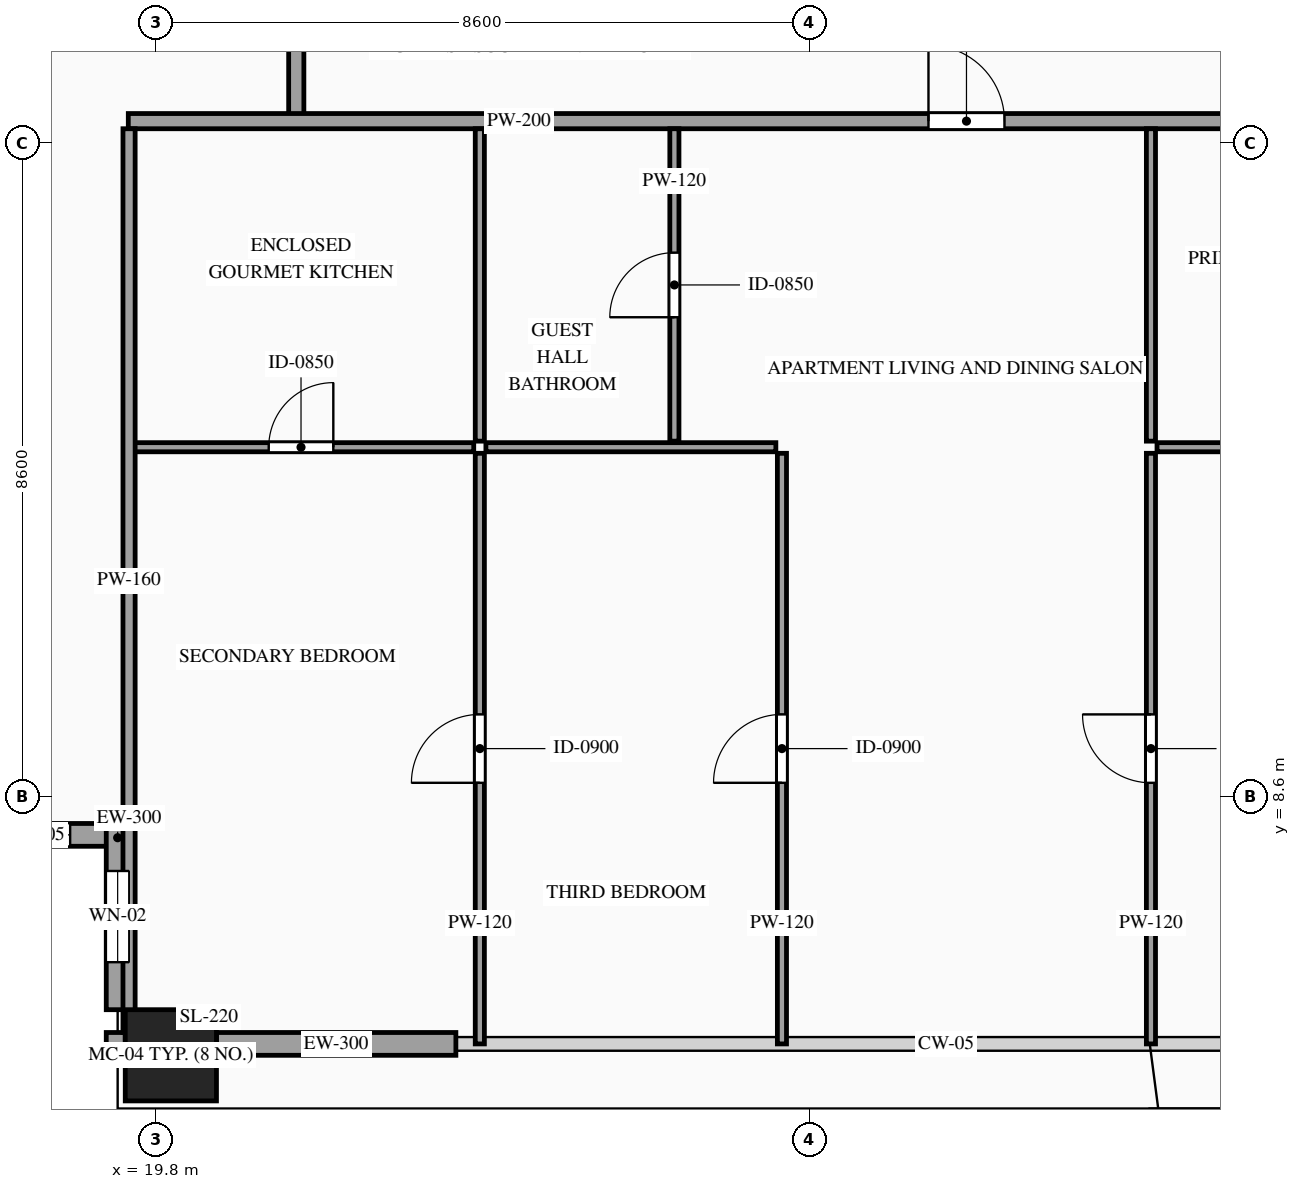
"""IFC4 building model, lengths in metres.
Left out: names, types, materials, properties, quantities, classifications, styles, units other than length and angle.
Written with IfcOpenShell. Run it as: python <this file> out.ifc"""

import sys

from ifc_helpers import new_model, si_unit, direction, frame, frame_2d, origin, origin_2d, place, context, subcontext, project, spatial, rectangle, hollow_rectangle, extrude, source, transform, mapped, element, fill, save


model = new_model("IFC4")
c1 = context("Model", 3, precision=1e-05, world=origin(), true_north=direction((0.0, 1.0)))
c2 = subcontext(c1, "Body", "Model", "MODEL_VIEW")
j1 = project(units=[si_unit("LENGTHUNIT", "METRE"), si_unit("PLANEANGLEUNIT", "RADIAN")], contexts=[c1])
p1 = place(None, origin())
s1 = spatial("IfcSite", under=j1, at=p1, CompositionType="ELEMENT")
p2 = place(p1, origin())
s2 = spatial("IfcBuilding", under=s1, at=p2, CompositionType="ELEMENT")
p3 = place(p2, frame((0.0, 0.0, 278.6)))
s3 = spatial("IfcBuildingStorey", under=s2, at=p3, CompositionType="ELEMENT", Elevation=278.6)
m1 = source(origin(), c2, "Body", "SweptSolid", [
    extrude(hollow_rectangle(XDim=1.2, YDim=1.2, WallThickness=0.055, at=origin_2d()), origin(), (0.0, 0.0, 1.0), 3.5),
])
p4 = place(p3, frame((20.0, 5.2, 0.0), z_axis=(0.0, 0.0, 1.0), x_axis=(1.0, 0.0, 0.0)))
e1 = element("IfcColumn", 1, at=p4, inside=s3, PredefinedType="COLUMN", context=c2, shape_type="MappedRepresentation", body=[
    mapped(m1, transform((0.0, 0.0, 0.0), scale=1.0)),
])
p5 = place(p3, frame((17.0, 8.1, 0.0), z_axis=(0.0, 0.0, 1.0), x_axis=(1.0, 0.0, 0.0)))
e2 = element("IfcWall", 2, at=p5, inside=s3, PredefinedType="SOLIDWALL", context=c2, shape_type="SweptSolid", body=[
    extrude(rectangle(XDim=2.45, YDim=0.3, at=frame_2d((1.225, 0.0))), origin(), (0.0, 0.0, 1.0), 3.28),
])
p6 = place(p5, frame((0.775, 0.0, 0.85)))
e3 = element("IfcOpeningElement", 3, at=p6, cuts=e2, PredefinedType="OPENING", context=c2, shape_type="SweptSolid", body=[
    extrude(rectangle(XDim=0.9, YDim=1.5, at=frame_2d((0.45, 0.75))), frame((0.0, 0.165, 0.0), z_axis=(0.0, -1.0, 0.0), x_axis=(1.0, 0.0, 0.0)), (0.0, 0.0, 1.0), 0.33),
])
p7 = place(p3, frame((19.3, 8.25, 0.0), z_axis=(0.0, 0.0, 1.0), x_axis=(0.0, -1.0, 0.0)))
e4 = element("IfcWall", 4, at=p7, inside=s3, PredefinedType="SOLIDWALL", context=c2, shape_type="SweptSolid", body=[
    extrude(rectangle(XDim=2.45, YDim=0.3, at=frame_2d((1.225, 0.0))), origin(), (0.0, 0.0, 1.0), 3.28),
])
p8 = place(p7, frame((0.625, 0.0, 0.85)))
e5 = element("IfcOpeningElement", 5, at=p8, cuts=e4, PredefinedType="OPENING", context=c2, shape_type="SweptSolid", body=[
    extrude(rectangle(XDim=1.2, YDim=2.1, at=frame_2d((0.6, 1.05))), frame((0.0, 0.165, 0.0), z_axis=(0.0, -1.0, 0.0), x_axis=(1.0, 0.0, 0.0)), (0.0, 0.0, 1.0), 0.33),
])
m2 = source(origin(), c2, "Body", "SweptSolid", [
    extrude(rectangle(XDim=0.25, YDim=0.3, at=frame_2d((0.125, 0.0))), origin(), (0.0, 0.0, 1.0), 3.28),
])
p9 = place(p3, frame((19.15, 5.35, 0.0), z_axis=(0.0, 0.0, 1.0), x_axis=(1.0, 0.0, 0.0)))
e6 = element("IfcWall", 6, at=p9, inside=s3, PredefinedType="SOLIDWALL", context=c2, shape_type="MappedRepresentation", body=[
    mapped(m2, transform((0.0, 0.0, 0.0), scale=1.0)),
])
m3 = source(origin(), c2, "Body", "SweptSolid", [
    extrude(rectangle(XDim=3.15, YDim=0.3, at=frame_2d((1.575, 0.0))), origin(), (0.0, 0.0, 1.0), 2.835),
])
p10 = place(p3, frame((20.6, 5.35, 0.0), z_axis=(0.0, 0.0, 1.0), x_axis=(1.0, 0.0, 0.0)))
e7 = element("IfcWall", 7, at=p10, inside=s3, PredefinedType="SOLIDWALL", context=c2, shape_type="MappedRepresentation", body=[
    mapped(m3, transform((0.0, 0.0, 0.0), scale=1.0)),
])
m4 = source(origin(), c2, "Body", "SweptSolid", [
    extrude(rectangle(XDim=1.7, YDim=0.2, at=frame_2d((0.85, 0.0))), origin(), (0.0, 0.0, 1.0), 3.28),
])
p11 = place(p3, frame((21.65, 17.55, 0.0), z_axis=(0.0, 0.0, 1.0), x_axis=(0.0, 1.0, 0.0)))
e8 = element("IfcWall", 8, at=p11, inside=s3, PredefinedType="PARTITIONING", context=c2, shape_type="MappedRepresentation", body=[
    mapped(m4, transform((0.0, 0.0, 0.0), scale=1.0)),
])
p12 = place(p3, frame((19.44, 17.49, 0.0), z_axis=(0.0, 0.0, 1.0), x_axis=(1.0, 0.0, 0.0)))
e9 = element("IfcWall", 9, at=p12, inside=s3, PredefinedType="PARTITIONING", context=c2, shape_type="SweptSolid", body=[
    extrude(rectangle(XDim=18.182, YDim=0.2, at=frame_2d((9.091, 0.0))), origin(), (0.0, 0.0, 1.0), 3.28),
])
p13 = place(p12, frame((10.528, 0.0, 0.0)))
e10 = element("IfcOpeningElement", 10, at=p13, cuts=e9, PredefinedType="OPENING", context=c2, shape_type="SweptSolid", body=[
    extrude(rectangle(XDim=1.0, YDim=2.2, at=frame_2d((0.5, 1.1))), frame((0.0, 0.115, 0.0), z_axis=(0.0, -1.0, 0.0), x_axis=(1.0, 0.0, 0.0)), (0.0, 0.0, 1.0), 0.23),
])
p14 = place(p3, frame((19.44, 13.2, 0.0), z_axis=(0.0, 0.0, 1.0), x_axis=(1.0, 0.0, 0.0)))
e11 = element("IfcWall", 11, at=p14, inside=s3, PredefinedType="PARTITIONING", context=c2, shape_type="SweptSolid", body=[
    extrude(rectangle(XDim=4.545, YDim=0.12, at=frame_2d((2.272, 0.0))), origin(), (0.0, 0.0, 1.0), 3.28),
])
p15 = place(p14, frame((1.847, 0.0, 0.0)))
e12 = element("IfcOpeningElement", 12, at=p15, cuts=e11, PredefinedType="OPENING", context=c2, shape_type="SweptSolid", body=[
    extrude(rectangle(XDim=0.85, YDim=2.1, at=frame_2d((0.425, 1.05))), frame((0.0, 0.075, 0.0), z_axis=(0.0, -1.0, 0.0), x_axis=(1.0, 0.0, 0.0)), (0.0, 0.0, 1.0), 0.15),
])
m5 = source(origin(), c2, "Body", "SweptSolid", [
    extrude(rectangle(XDim=4.11, YDim=0.12, at=frame_2d((2.055, 0.0))), origin(), (0.0, 0.0, 1.0), 3.28),
])
p16 = place(p3, frame((24.065, 13.28, 0.0), z_axis=(0.0, 0.0, 1.0), x_axis=(0.0, 1.0, 0.0)))
e13 = element("IfcWall", 13, at=p16, inside=s3, PredefinedType="PARTITIONING", context=c2, shape_type="MappedRepresentation", body=[
    mapped(m5, transform((0.0, 0.0, 0.0), scale=1.0)),
])
p17 = place(p3, frame((26.625, 13.28, 0.0), z_axis=(0.0, 0.0, 1.0), x_axis=(0.0, 1.0, 0.0)))
e14 = element("IfcWall", 14, at=p17, inside=s3, PredefinedType="PARTITIONING", context=c2, shape_type="SweptSolid", body=[
    extrude(rectangle(XDim=4.11, YDim=0.12, at=frame_2d((2.055, 0.0))), origin(), (0.0, 0.0, 1.0), 3.28),
])
p18 = place(p17, frame((1.63, 0.0, 0.0)))
e15 = element("IfcOpeningElement", 15, at=p18, cuts=e14, PredefinedType="OPENING", context=c2, shape_type="SweptSolid", body=[
    extrude(rectangle(XDim=0.85, YDim=2.1, at=frame_2d((0.425, 1.05))), frame((0.0, 0.075, 0.0), z_axis=(0.0, -1.0, 0.0), x_axis=(1.0, 0.0, 0.0)), (0.0, 0.0, 1.0), 0.15),
])
p19 = place(p3, frame((32.975, 13.2, 0.0), z_axis=(0.0, 0.0, 1.0), x_axis=(1.0, 0.0, 0.0)))
e16 = element("IfcWall", 16, at=p19, inside=s3, PredefinedType="PARTITIONING", context=c2, shape_type="SweptSolid", body=[
    extrude(rectangle(XDim=4.647, YDim=0.12, at=frame_2d((2.323, 0.0))), origin(), (0.0, 0.0, 1.0), 3.28),
])
p20 = place(p19, frame((1.898, 0.0, 0.0)))
e17 = element("IfcOpeningElement", 17, at=p20, cuts=e16, PredefinedType="OPENING", context=c2, shape_type="SweptSolid", body=[
    extrude(rectangle(XDim=0.85, YDim=2.1, at=frame_2d((0.425, 1.05))), frame((0.0, 0.075, 0.0), z_axis=(0.0, -1.0, 0.0), x_axis=(1.0, 0.0, 0.0)), (0.0, 0.0, 1.0), 0.15),
])
p21 = place(p3, frame((32.895, 13.28, 0.0), z_axis=(0.0, 0.0, 1.0), x_axis=(0.0, 1.0, 0.0)))
e18 = element("IfcWall", 18, at=p21, inside=s3, PredefinedType="PARTITIONING", context=c2, shape_type="MappedRepresentation", body=[
    mapped(m5, transform((0.0, 0.0, 0.0), scale=1.0)),
])
p22 = place(p3, frame((24.065, 5.35, 0.0), z_axis=(0.0, 0.0, 1.0), x_axis=(0.0, 1.0, 0.0)))
e19 = element("IfcWall", 19, at=p22, inside=s3, PredefinedType="PARTITIONING", context=c2, shape_type="SweptSolid", body=[
    extrude(rectangle(XDim=7.77, YDim=0.12, at=frame_2d((3.885, 0.0))), origin(), (0.0, 0.0, 1.0), 3.28),
])
p23 = place(p22, frame((3.435, 0.0, 0.0)))
e20 = element("IfcOpeningElement", 20, at=p23, cuts=e19, PredefinedType="OPENING", context=c2, shape_type="SweptSolid", body=[
    extrude(rectangle(XDim=0.9, YDim=2.15, at=frame_2d((0.45, 1.075))), frame((0.0, 0.075, 0.0), z_axis=(0.0, -1.0, 0.0), x_axis=(1.0, 0.0, 0.0)), (0.0, 0.0, 1.0), 0.15),
])
p24 = place(p3, frame((32.895, 5.35, 0.0), z_axis=(0.0, 0.0, 1.0), x_axis=(0.0, 1.0, 0.0)))
e21 = element("IfcWall", 21, at=p24, inside=s3, PredefinedType="PARTITIONING", context=c2, shape_type="SweptSolid", body=[
    extrude(rectangle(XDim=7.77, YDim=0.12, at=frame_2d((3.885, 0.0))), origin(), (0.0, 0.0, 1.0), 3.28),
])
p25 = place(p24, frame((3.435, 0.0, 0.0)))
e22 = element("IfcOpeningElement", 22, at=p25, cuts=e21, PredefinedType="OPENING", context=c2, shape_type="SweptSolid", body=[
    extrude(rectangle(XDim=0.9, YDim=2.15, at=frame_2d((0.45, 1.075))), frame((0.0, 0.075, 0.0), z_axis=(0.0, -1.0, 0.0), x_axis=(1.0, 0.0, 0.0)), (0.0, 0.0, 1.0), 0.15),
])
m6 = source(origin(), c2, "Body", "SweptSolid", [
    extrude(rectangle(XDim=3.815, YDim=0.12, at=frame_2d((1.907, 0.0))), origin(), (0.0, 0.0, 1.0), 3.28),
])
p26 = place(p3, frame((24.145, 13.2, 0.0), z_axis=(0.0, 0.0, 1.0), x_axis=(1.0, 0.0, 0.0)))
e23 = element("IfcWall", 23, at=p26, inside=s3, PredefinedType="PARTITIONING", context=c2, shape_type="MappedRepresentation", body=[
    mapped(m6, transform((0.0, 0.0, 0.0), scale=1.0)),
])
p27 = place(p3, frame((28.04, 5.35, 0.0), z_axis=(0.0, 0.0, 1.0), x_axis=(0.0, 1.0, 0.0)))
e24 = element("IfcWall", 24, at=p27, inside=s3, PredefinedType="PARTITIONING", context=c2, shape_type="SweptSolid", body=[
    extrude(rectangle(XDim=7.77, YDim=0.12, at=frame_2d((3.885, 0.0))), origin(), (0.0, 0.0, 1.0), 3.28),
])
p28 = place(p27, frame((3.435, 0.0, 0.0)))
e25 = element("IfcOpeningElement", 25, at=p28, cuts=e24, PredefinedType="OPENING", context=c2, shape_type="SweptSolid", body=[
    extrude(rectangle(XDim=0.9, YDim=2.15, at=frame_2d((0.45, 1.075))), frame((0.0, 0.075, 0.0), z_axis=(0.0, -1.0, 0.0), x_axis=(1.0, 0.0, 0.0)), (0.0, 0.0, 1.0), 0.15),
])
m7 = source(origin(), c2, "Body", "SweptSolid", [
    extrude(rectangle(XDim=11.89, YDim=0.16, at=frame_2d((5.945, 0.0))), origin(), (0.0, 0.0, 1.0), 3.28),
])
p29 = place(p3, frame((19.45, 5.5, 0.0), z_axis=(0.0, 0.0, 1.0), x_axis=(0.0, 1.0, 0.0)))
e26 = element("IfcWall", 26, at=p29, inside=s3, PredefinedType="PARTITIONING", context=c2, shape_type="MappedRepresentation", body=[
    mapped(m7, transform((0.0, 0.0, 0.0), scale=1.0)),
])
m8 = source(origin(), c2, "Body", "SweptSolid", [
    extrude(rectangle(XDim=0.9, YDim=1.5, at=frame_2d((0.45, 0.75))), frame((0.0, 0.03, 0.0), z_axis=(0.0, -1.0, 0.0), x_axis=(1.0, 0.0, 0.0)), (0.0, 0.0, 1.0), 0.06),
])
p30 = place(p6, origin())
e27 = element("IfcWindow", 27, at=p30, inside=s3, PartitioningType="SINGLE_PANEL", PredefinedType="WINDOW", context=c2, shape_type="MappedRepresentation", body=[
    mapped(m8, transform((0.0, 0.0, 0.0), scale=1.0)),
])
fill(e3, e27)
m9 = source(origin(), c2, "Body", "SweptSolid", [
    extrude(rectangle(XDim=1.2, YDim=2.1, at=frame_2d((0.6, 1.05))), frame((0.0, 0.03, 0.0), z_axis=(0.0, -1.0, 0.0), x_axis=(1.0, 0.0, 0.0)), (0.0, 0.0, 1.0), 0.06),
])
p31 = place(p8, origin())
e28 = element("IfcWindow", 28, at=p31, inside=s3, PartitioningType="SINGLE_PANEL", PredefinedType="WINDOW", context=c2, shape_type="MappedRepresentation", body=[
    mapped(m9, transform((0.0, 0.0, 0.0), scale=1.0)),
])
fill(e5, e28)
m10 = source(origin(), c2, "Body", "SweptSolid", [
    extrude(rectangle(XDim=1.0, YDim=2.2, at=frame_2d((0.5, 1.1))), frame((0.0, 0.025, 0.0), z_axis=(0.0, -1.0, 0.0), x_axis=(1.0, 0.0, 0.0)), (0.0, 0.0, 1.0), 0.05),
])
p32 = place(p13, origin())
e29 = element("IfcDoor", 29, at=p32, inside=s3, OperationType="SINGLE_SWING_LEFT", PredefinedType="DOOR", context=c2, shape_type="MappedRepresentation", body=[
    mapped(m10, transform((0.0, 0.0, 0.0), scale=1.0)),
])
fill(e10, e29)
m11 = source(origin(), c2, "Body", "SweptSolid", [
    extrude(rectangle(XDim=0.85, YDim=2.1, at=frame_2d((0.425, 1.05))), frame((0.0, 0.025, 0.0), z_axis=(0.0, -1.0, 0.0), x_axis=(1.0, 0.0, 0.0)), (0.0, 0.0, 1.0), 0.05),
])
p33 = place(p15, origin())
e30 = element("IfcDoor", 30, at=p33, inside=s3, OperationType="SINGLE_SWING_RIGHT", PredefinedType="DOOR", context=c2, shape_type="MappedRepresentation", body=[
    mapped(m11, transform((0.0, 0.0, 0.0), scale=1.0)),
])
fill(e12, e30)
p34 = place(p18, origin())
e31 = element("IfcDoor", 31, at=p34, inside=s3, OperationType="SINGLE_SWING_LEFT", PredefinedType="DOOR", context=c2, shape_type="MappedRepresentation", body=[
    mapped(m11, transform((0.0, 0.0, 0.0), scale=1.0)),
])
fill(e15, e31)
m12 = source(origin(), c2, "Body", "SweptSolid", [
    extrude(rectangle(XDim=0.9, YDim=2.15, at=frame_2d((0.45, 1.075))), frame((0.0, 0.025, 0.0), z_axis=(0.0, -1.0, 0.0), x_axis=(1.0, 0.0, 0.0)), (0.0, 0.0, 1.0), 0.05),
])
p35 = place(p23, origin())
e32 = element("IfcDoor", 32, at=p35, inside=s3, OperationType="SINGLE_SWING_LEFT", PredefinedType="DOOR", context=c2, shape_type="MappedRepresentation", body=[
    mapped(m12, transform((0.0, 0.0, 0.0), scale=1.0)),
])
fill(e20, e32)
p36 = place(p25, origin())
e33 = element("IfcDoor", 33, at=p36, inside=s3, OperationType="SINGLE_SWING_RIGHT", PredefinedType="DOOR", context=c2, shape_type="MappedRepresentation", body=[
    mapped(m12, transform((0.0, 0.0, 0.0), scale=1.0)),
])
fill(e22, e33)
p37 = place(p28, origin())
e34 = element("IfcDoor", 34, at=p37, inside=s3, OperationType="SINGLE_SWING_LEFT", PredefinedType="DOOR", context=c2, shape_type="MappedRepresentation", body=[
    mapped(m12, transform((0.0, 0.0, 0.0), scale=1.0)),
])
fill(e25, e34)
save(model, sys.argv[1])
